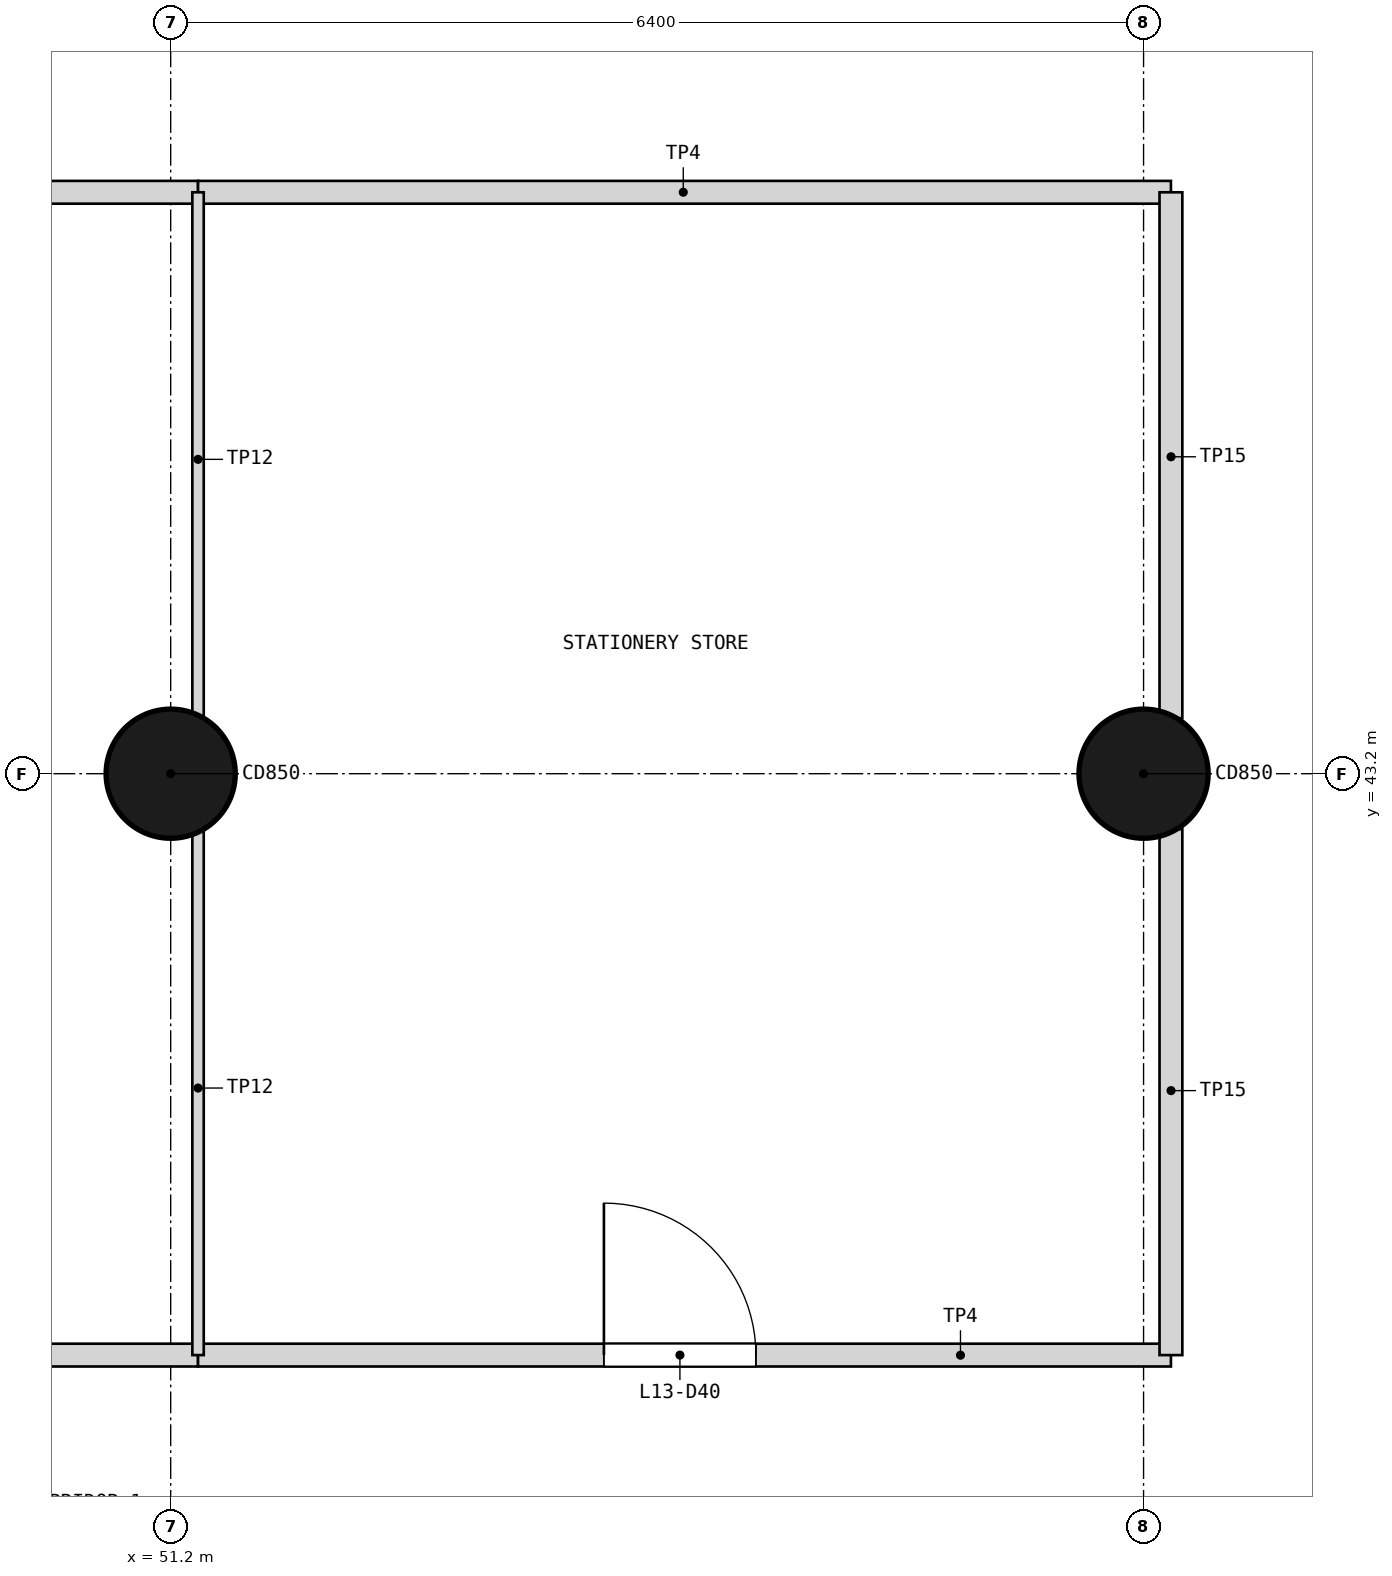
"""IFC4 building model, lengths in metres.
Left out: names, types, materials, properties, quantities, classifications, styles, units other than length and angle.
Written with IfcOpenShell. Run it as: python <this file> out.ifc"""

import sys

from ifc_helpers import new_model, si_unit, direction, frame, frame_2d, origin, origin_2d, place, context, subcontext, project, spatial, rectangle, circle, extrude, element, fill, save


model = new_model("IFC4")
c1 = context("Model", 3, precision=1e-05, world=origin(), true_north=direction((0.0, 1.0)))
c2 = subcontext(c1, "Body", "Model", "MODEL_VIEW")
j1 = project(units=[si_unit("LENGTHUNIT", "METRE"), si_unit("PLANEANGLEUNIT", "RADIAN")], contexts=[c1])
p1 = place(None, origin())
s1 = spatial("IfcSite", under=j1, at=p1, CompositionType="ELEMENT")
p2 = place(p1, origin())
s2 = spatial("IfcBuilding", under=s1, at=p2, CompositionType="ELEMENT")
p3 = place(p2, frame((0.0, 0.0, 52.2)))
s3 = spatial("IfcBuildingStorey", under=s2, at=p3, CompositionType="ELEMENT", Elevation=52.2)
for number, where, z_axis, x_axis in (
    (1, (51.2, 43.2, 0.0), (0.0, 0.0, 1.0), (1.0, 0.0, 0.0)),
    (2, (57.6, 43.2, 0.0), (0.0, 0.0, 1.0), (1.0, 0.0, 0.0)),
):
    element("IfcColumn", number, at=place(p3, frame(where, z_axis=z_axis, x_axis=x_axis)), inside=s3, PredefinedType="COLUMN", context=c2, shape_type="SweptSolid", body=[
        extrude(circle(Radius=0.425, at=origin_2d()), origin(), (0.0, 0.0, 1.0), 3.9),
    ])
p4 = place(p3, frame((44.62, 39.375, 0.0), z_axis=(0.0, 0.0, 1.0), x_axis=(1.0, 0.0, 0.0)))
e3 = element("IfcWall", 3, at=p4, inside=s3, PredefinedType="PARTITIONING", context=c2, shape_type="SweptSolid", body=[
    extrude(rectangle(XDim=6.76, YDim=0.15, at=frame_2d((3.38, 0.0))), origin(), (0.0, 0.0, 1.0), 3.68),
])
p5 = place(p4, frame((2.88, 0.0, 0.0)))
e4 = element("IfcOpeningElement", 4, at=p5, cuts=e3, PredefinedType="OPENING", context=c2, shape_type="SweptSolid", body=[
    extrude(rectangle(XDim=1.0, YDim=2.1, at=frame_2d((0.5, 1.05))), frame((0.0, 0.085, 0.0), z_axis=(0.0, -1.0, 0.0), x_axis=(1.0, 0.0, 0.0)), (0.0, 0.0, 1.0), 0.17),
])
p6 = place(p3, frame((44.62, 47.025, 0.0), z_axis=(0.0, 0.0, 1.0), x_axis=(1.0, 0.0, 0.0)))
e5 = element("IfcWall", 5, at=p6, inside=s3, PredefinedType="PARTITIONING", context=c2, shape_type="SweptSolid", body=[
    extrude(rectangle(XDim=6.76, YDim=0.15, at=frame_2d((3.38, 0.0))), origin(), (0.0, 0.0, 1.0), 3.68),
])
p7 = place(p3, frame((51.38, 39.375, 0.0), z_axis=(0.0, 0.0, 1.0), x_axis=(1.0, 0.0, 0.0)))
e6 = element("IfcWall", 6, at=p7, inside=s3, PredefinedType="PARTITIONING", context=c2, shape_type="SweptSolid", body=[
    extrude(rectangle(XDim=6.4, YDim=0.15, at=frame_2d((3.2, 0.0))), origin(), (0.0, 0.0, 1.0), 3.68),
])
p8 = place(p7, frame((2.67, 0.0, 0.0)))
e7 = element("IfcOpeningElement", 7, at=p8, cuts=e6, PredefinedType="OPENING", context=c2, shape_type="SweptSolid", body=[
    extrude(rectangle(XDim=1.0, YDim=2.1, at=frame_2d((0.5, 1.05))), frame((0.0, 0.085, 0.0), z_axis=(0.0, -1.0, 0.0), x_axis=(1.0, 0.0, 0.0)), (0.0, 0.0, 1.0), 0.17),
])
p9 = place(p3, frame((51.38, 47.025, 0.0), z_axis=(0.0, 0.0, 1.0), x_axis=(1.0, 0.0, 0.0)))
e8 = element("IfcWall", 8, at=p9, inside=s3, PredefinedType="PARTITIONING", context=c2, shape_type="SweptSolid", body=[
    extrude(rectangle(XDim=6.4, YDim=0.15, at=frame_2d((3.2, 0.0))), origin(), (0.0, 0.0, 1.0), 3.68),
])
for number, where, z_axis, x_axis in (
    (9, (51.38, 39.375, 0.0), (0.0, 0.0, 1.0), (0.0, 1.0, 0.0)),
    (10, (51.38, 43.565, 0.0), (0.0, 0.0, 1.0), (0.0, 1.0, 0.0)),
):
    element("IfcWall", number, at=place(p3, frame(where, z_axis=z_axis, x_axis=x_axis)), inside=s3, PredefinedType="PARTITIONING", context=c2, shape_type="SweptSolid", body=[
        extrude(rectangle(XDim=3.46, YDim=0.075, at=frame_2d((1.73, 0.0))), origin(), (0.0, 0.0, 1.0), 2.78),
    ])
for number, where, z_axis, x_axis in (
    (11, (57.78, 39.375, 0.0), (0.0, 0.0, 1.0), (0.0, 1.0, 0.0)),
    (12, (57.78, 43.565, 0.0), (0.0, 0.0, 1.0), (0.0, 1.0, 0.0)),
):
    element("IfcWall", number, at=place(p3, frame(where, z_axis=z_axis, x_axis=x_axis)), inside=s3, PredefinedType="PARTITIONING", context=c2, shape_type="SweptSolid", body=[
        extrude(rectangle(XDim=3.46, YDim=0.15, at=frame_2d((1.73, 0.0))), origin(), (0.0, 0.0, 1.0), 2.78),
    ])
p10 = place(p8, origin())
e13 = element("IfcDoor", 13, at=p10, inside=s3, OperationType="SINGLE_SWING_LEFT", PredefinedType="DOOR", context=c2, shape_type="SweptSolid", body=[
    extrude(rectangle(XDim=1.0, YDim=2.1, at=frame_2d((0.5, 1.05))), frame((0.0, 0.025, 0.0), z_axis=(0.0, -1.0, 0.0), x_axis=(1.0, 0.0, 0.0)), (0.0, 0.0, 1.0), 0.05),
])
fill(e7, e13)
save(model, sys.argv[1])
